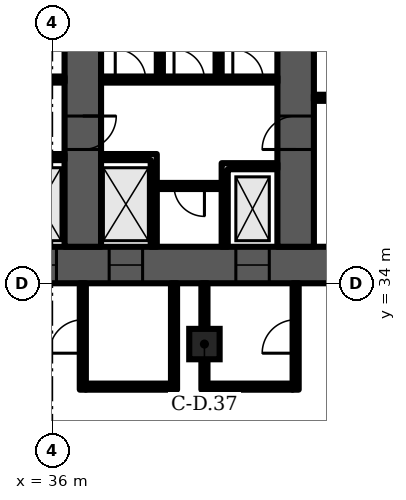
"""IFC4 building model, lengths in metres.
Left out: names, types, materials, properties, quantities, classifications, styles, units other than length and angle.
Written with IfcOpenShell. Run it as: python <this file> out.ifc"""

import sys

from ifc_helpers import new_model, si_unit, direction, frame, frame_2d, origin, origin_2d, place, context, subcontext, project, spatial, polyline, rectangle, outline, extrude, element, fill, save


model = new_model("IFC4")
c1 = context("Model", 3, precision=1e-05, world=origin(), true_north=direction((0.0, 1.0)))
c2 = subcontext(c1, "Body", "Model", "MODEL_VIEW")
j1 = project(units=[si_unit("LENGTHUNIT", "METRE"), si_unit("PLANEANGLEUNIT", "RADIAN")], contexts=[c1])
p1 = place(None, origin())
s1 = spatial("IfcSite", under=j1, at=p1, CompositionType="ELEMENT")
p2 = place(p1, origin())
s2 = spatial("IfcBuilding", under=s1, at=p2, CompositionType="ELEMENT")
p3 = place(p2, origin())
s3 = spatial("IfcBuildingStorey", under=s2, at=p3, CompositionType="ELEMENT", Elevation=0.0)
p4 = place(p3, frame((41.0, 32.0, 0.0), z_axis=(0.0, 0.0, 1.0), x_axis=(1.0, 0.0, 0.0)))
e1 = element("IfcColumn", 1, at=p4, inside=s3, PredefinedType="COLUMN", context=c2, shape_type="SweptSolid", body=[
    extrude(rectangle(XDim=1.0, YDim=1.0, at=origin_2d()), origin(), (0.0, 0.0, 1.0), 8.0),
])
p5 = place(p3, frame((9.0, 34.6, 0.0), z_axis=(0.0, 0.0, 1.0), x_axis=(1.0, 0.0, 0.0)))
e2 = element("IfcWall", 2, at=p5, inside=s3, PredefinedType="SHEAR", context=c2, shape_type="SweptSolid", body=[
    extrude(rectangle(XDim=56.0, YDim=1.2, at=frame_2d((28.0, 0.0))), origin(), (0.0, 0.0, 1.0), 7.7),
])
p6 = place(p5, frame((3.3, 0.0, 0.0)))
e3 = element("IfcOpeningElement", 3, at=p6, cuts=e2, PredefinedType="OPENING", context=c2, shape_type="SweptSolid", body=[
    extrude(rectangle(XDim=1.0, YDim=2.1, at=frame_2d((0.5, 1.05))), frame((0.0, 0.61, 0.0), z_axis=(0.0, -1.0, 0.0), x_axis=(1.0, 0.0, 0.0)), (0.0, 0.0, 1.0), 1.22),
])
p7 = place(p5, frame((7.867, 0.0, 0.0)))
e4 = element("IfcOpeningElement", 4, at=p7, cuts=e2, PredefinedType="OPENING", context=c2, shape_type="SweptSolid", body=[
    extrude(rectangle(XDim=1.1, YDim=2.1, at=frame_2d((0.55, 1.05))), frame((0.0, 0.61, 0.0), z_axis=(0.0, -1.0, 0.0), x_axis=(1.0, 0.0, 0.0)), (0.0, 0.0, 1.0), 1.22),
])
p8 = place(p5, frame((12.033, 0.0, 0.0)))
e5 = element("IfcOpeningElement", 5, at=p8, cuts=e2, PredefinedType="OPENING", context=c2, shape_type="SweptSolid", body=[
    extrude(rectangle(XDim=1.1, YDim=2.1, at=frame_2d((0.55, 1.05))), frame((0.0, 0.61, 0.0), z_axis=(0.0, -1.0, 0.0), x_axis=(1.0, 0.0, 0.0)), (0.0, 0.0, 1.0), 1.22),
])
p9 = place(p5, frame((9.8, 0.0, 0.0)))
e6 = element("IfcOpeningElement", 6, at=p9, cuts=e2, PredefinedType="OPENING", context=c2, shape_type="SweptSolid", body=[
    extrude(rectangle(XDim=1.4, YDim=2.1, at=frame_2d((0.7, 1.05))), frame((0.0, 0.61, 0.0), z_axis=(0.0, -1.0, 0.0), x_axis=(1.0, 0.0, 0.0)), (0.0, 0.0, 1.0), 1.22),
])
p10 = place(p5, frame((14.65, 0.0, 0.0)))
e7 = element("IfcOpeningElement", 7, at=p10, cuts=e2, PredefinedType="OPENING", context=c2, shape_type="SweptSolid", body=[
    extrude(rectangle(XDim=1.2, YDim=2.1, at=frame_2d((0.6, 1.05))), frame((0.0, 0.61, 0.0), z_axis=(0.0, -1.0, 0.0), x_axis=(1.0, 0.0, 0.0)), (0.0, 0.0, 1.0), 1.22),
])
p11 = place(p5, frame((21.867, 0.0, 0.0)))
e8 = element("IfcOpeningElement", 8, at=p11, cuts=e2, PredefinedType="OPENING", context=c2, shape_type="SweptSolid", body=[
    extrude(rectangle(XDim=1.1, YDim=2.1, at=frame_2d((0.55, 1.05))), frame((0.0, 0.61, 0.0), z_axis=(0.0, -1.0, 0.0), x_axis=(1.0, 0.0, 0.0)), (0.0, 0.0, 1.0), 1.22),
])
p12 = place(p5, frame((26.033, 0.0, 0.0)))
e9 = element("IfcOpeningElement", 9, at=p12, cuts=e2, PredefinedType="OPENING", context=c2, shape_type="SweptSolid", body=[
    extrude(rectangle(XDim=1.1, YDim=2.1, at=frame_2d((0.55, 1.05))), frame((0.0, 0.61, 0.0), z_axis=(0.0, -1.0, 0.0), x_axis=(1.0, 0.0, 0.0)), (0.0, 0.0, 1.0), 1.22),
])
p13 = place(p5, frame((23.8, 0.0, 0.0)))
e10 = element("IfcOpeningElement", 10, at=p13, cuts=e2, PredefinedType="OPENING", context=c2, shape_type="SweptSolid", body=[
    extrude(rectangle(XDim=1.4, YDim=2.1, at=frame_2d((0.7, 1.05))), frame((0.0, 0.61, 0.0), z_axis=(0.0, -1.0, 0.0), x_axis=(1.0, 0.0, 0.0)), (0.0, 0.0, 1.0), 1.22),
])
p14 = place(p5, frame((28.867, 0.0, 0.0)))
e11 = element("IfcOpeningElement", 11, at=p14, cuts=e2, PredefinedType="OPENING", context=c2, shape_type="SweptSolid", body=[
    extrude(rectangle(XDim=1.1, YDim=2.1, at=frame_2d((0.55, 1.05))), frame((0.0, 0.61, 0.0), z_axis=(0.0, -1.0, 0.0), x_axis=(1.0, 0.0, 0.0)), (0.0, 0.0, 1.0), 1.22),
])
p15 = place(p5, frame((33.033, 0.0, 0.0)))
e12 = element("IfcOpeningElement", 12, at=p15, cuts=e2, PredefinedType="OPENING", context=c2, shape_type="SweptSolid", body=[
    extrude(rectangle(XDim=1.1, YDim=2.1, at=frame_2d((0.55, 1.05))), frame((0.0, 0.61, 0.0), z_axis=(0.0, -1.0, 0.0), x_axis=(1.0, 0.0, 0.0)), (0.0, 0.0, 1.0), 1.22),
])
p16 = place(p5, frame((40.15, 0.0, 0.0)))
e13 = element("IfcOpeningElement", 13, at=p16, cuts=e2, PredefinedType="OPENING", context=c2, shape_type="SweptSolid", body=[
    extrude(rectangle(XDim=1.2, YDim=2.1, at=frame_2d((0.6, 1.05))), frame((0.0, 0.61, 0.0), z_axis=(0.0, -1.0, 0.0), x_axis=(1.0, 0.0, 0.0)), (0.0, 0.0, 1.0), 1.22),
])
p17 = place(p5, frame((42.867, 0.0, 0.0)))
e14 = element("IfcOpeningElement", 14, at=p17, cuts=e2, PredefinedType="OPENING", context=c2, shape_type="SweptSolid", body=[
    extrude(rectangle(XDim=1.1, YDim=2.1, at=frame_2d((0.55, 1.05))), frame((0.0, 0.61, 0.0), z_axis=(0.0, -1.0, 0.0), x_axis=(1.0, 0.0, 0.0)), (0.0, 0.0, 1.0), 1.22),
])
p18 = place(p5, frame((47.033, 0.0, 0.0)))
e15 = element("IfcOpeningElement", 15, at=p18, cuts=e2, PredefinedType="OPENING", context=c2, shape_type="SweptSolid", body=[
    extrude(rectangle(XDim=1.1, YDim=2.1, at=frame_2d((0.55, 1.05))), frame((0.0, 0.61, 0.0), z_axis=(0.0, -1.0, 0.0), x_axis=(1.0, 0.0, 0.0)), (0.0, 0.0, 1.0), 1.22),
])
p19 = place(p5, frame((44.8, 0.0, 0.0)))
e16 = element("IfcOpeningElement", 16, at=p19, cuts=e2, PredefinedType="OPENING", context=c2, shape_type="SweptSolid", body=[
    extrude(rectangle(XDim=1.4, YDim=2.1, at=frame_2d((0.7, 1.05))), frame((0.0, 0.61, 0.0), z_axis=(0.0, -1.0, 0.0), x_axis=(1.0, 0.0, 0.0)), (0.0, 0.0, 1.0), 1.22),
])
p20 = place(p5, frame((49.867, 0.0, 0.0)))
e17 = element("IfcOpeningElement", 17, at=p20, cuts=e2, PredefinedType="OPENING", context=c2, shape_type="SweptSolid", body=[
    extrude(rectangle(XDim=1.1, YDim=2.1, at=frame_2d((0.55, 1.05))), frame((0.0, 0.61, 0.0), z_axis=(0.0, -1.0, 0.0), x_axis=(1.0, 0.0, 0.0)), (0.0, 0.0, 1.0), 1.22),
])
p21 = place(p5, frame((53.5, 0.0, 0.0)))
e18 = element("IfcOpeningElement", 18, at=p21, cuts=e2, PredefinedType="OPENING", context=c2, shape_type="SweptSolid", body=[
    extrude(rectangle(XDim=1.1, YDim=2.1, at=frame_2d((0.55, 1.05))), frame((0.0, 0.61, 0.0), z_axis=(0.0, -1.0, 0.0), x_axis=(1.0, 0.0, 0.0)), (0.0, 0.0, 1.0), 1.22),
])
p22 = place(p5, frame((51.567, 0.0, 0.0)))
e19 = element("IfcOpeningElement", 19, at=p22, cuts=e2, PredefinedType="OPENING", context=c2, shape_type="SweptSolid", body=[
    extrude(rectangle(XDim=1.4, YDim=2.1, at=frame_2d((0.7, 1.05))), frame((0.0, 0.61, 0.0), z_axis=(0.0, -1.0, 0.0), x_axis=(1.0, 0.0, 0.0)), (0.0, 0.0, 1.0), 1.22),
])
p23 = place(p3, frame((37.0, 35.2, 0.0), z_axis=(0.0, 0.0, 1.0), x_axis=(0.0, 1.0, 0.0)))
e20 = element("IfcWall", 20, at=p23, inside=s3, PredefinedType="SHEAR", context=c2, shape_type="SweptSolid", body=[
    extrude(rectangle(XDim=12.8, YDim=1.2, at=frame_2d((6.4, 0.0))), origin(), (0.0, 0.0, 1.0), 7.7),
])
p24 = place(p23, frame((3.2, 0.0, 0.0)))
e21 = element("IfcOpeningElement", 21, at=p24, cuts=e20, PredefinedType="OPENING", context=c2, shape_type="SweptSolid", body=[
    extrude(rectangle(XDim=1.1, YDim=2.1, at=frame_2d((0.55, 1.05))), frame((0.0, 0.61, 0.0), z_axis=(0.0, -1.0, 0.0), x_axis=(1.0, 0.0, 0.0)), (0.0, 0.0, 1.0), 1.22),
])
p25 = place(p23, frame((9.6, 0.0, 0.0)))
e22 = element("IfcOpeningElement", 22, at=p25, cuts=e20, PredefinedType="OPENING", context=c2, shape_type="SweptSolid", body=[
    extrude(rectangle(XDim=1.0, YDim=2.1, at=frame_2d((0.5, 1.05))), frame((0.0, 0.61, 0.0), z_axis=(0.0, -1.0, 0.0), x_axis=(1.0, 0.0, 0.0)), (0.0, 0.0, 1.0), 1.22),
])
p26 = place(p3, frame((44.0, 35.2, 0.0), z_axis=(0.0, 0.0, 1.0), x_axis=(0.0, 1.0, 0.0)))
e23 = element("IfcWall", 23, at=p26, inside=s3, PredefinedType="SHEAR", context=c2, shape_type="SweptSolid", body=[
    extrude(rectangle(XDim=12.8, YDim=1.2, at=frame_2d((6.4, 0.0))), origin(), (0.0, 0.0, 1.0), 7.7),
])
p27 = place(p26, frame((3.2, 0.0, 0.0)))
e24 = element("IfcOpeningElement", 24, at=p27, cuts=e23, PredefinedType="OPENING", context=c2, shape_type="SweptSolid", body=[
    extrude(rectangle(XDim=1.1, YDim=2.1, at=frame_2d((0.55, 1.05))), frame((0.0, 0.61, 0.0), z_axis=(0.0, -1.0, 0.0), x_axis=(1.0, 0.0, 0.0)), (0.0, 0.0, 1.0), 1.22),
])
p28 = place(p26, frame((9.6, 0.0, 0.0)))
e25 = element("IfcOpeningElement", 25, at=p28, cuts=e23, PredefinedType="OPENING", context=c2, shape_type="SweptSolid", body=[
    extrude(rectangle(XDim=1.0, YDim=2.1, at=frame_2d((0.5, 1.05))), frame((0.0, 0.61, 0.0), z_axis=(0.0, -1.0, 0.0), x_axis=(1.0, 0.0, 0.0)), (0.0, 0.0, 1.0), 1.22),
])
p29 = place(p3, frame((30.6, 40.7, 0.0), z_axis=(0.0, 0.0, 1.0), x_axis=(1.0, 0.0, 0.0)))
e26 = element("IfcWall", 26, at=p29, inside=s3, PredefinedType="PARTITIONING", context=c2, shape_type="SweptSolid", body=[
    extrude(rectangle(XDim=5.8, YDim=0.2, at=frame_2d((2.9, 0.0))), origin(), (0.0, 0.0, 1.0), 7.7),
])
p30 = place(p29, frame((0.467, 0.0, 0.0)))
e27 = element("IfcOpeningElement", 27, at=p30, cuts=e26, PredefinedType="OPENING", context=c2, shape_type="SweptSolid", body=[
    extrude(rectangle(XDim=1.0, YDim=2.1, at=frame_2d((0.5, 1.05))), frame((0.0, 0.11, 0.0), z_axis=(0.0, -1.0, 0.0), x_axis=(1.0, 0.0, 0.0)), (0.0, 0.0, 1.0), 0.22),
])
p31 = place(p29, frame((2.4, 0.0, 0.0)))
e28 = element("IfcOpeningElement", 28, at=p31, cuts=e26, PredefinedType="OPENING", context=c2, shape_type="SweptSolid", body=[
    extrude(rectangle(XDim=1.0, YDim=2.1, at=frame_2d((0.5, 1.05))), frame((0.0, 0.11, 0.0), z_axis=(0.0, -1.0, 0.0), x_axis=(1.0, 0.0, 0.0)), (0.0, 0.0, 1.0), 0.22),
])
p32 = place(p29, frame((4.333, 0.0, 0.0)))
e29 = element("IfcOpeningElement", 29, at=p32, cuts=e26, PredefinedType="OPENING", context=c2, shape_type="SweptSolid", body=[
    extrude(rectangle(XDim=1.0, YDim=2.1, at=frame_2d((0.5, 1.05))), frame((0.0, 0.11, 0.0), z_axis=(0.0, -1.0, 0.0), x_axis=(1.0, 0.0, 0.0)), (0.0, 0.0, 1.0), 0.22),
])
p33 = place(p3, frame((0.0, 0.0, -0.0)))
e30 = element("IfcWall", 30, at=p33, inside=s3, PredefinedType="PARTITIONING", context=c2, shape_type="SweptSolid", body=[
    extrude(outline(polyline([(34.567, 38.25), (34.767, 38.25), (36.4, 38.25), (36.4, 38.05), (34.767, 38.05), (34.767, 35.2), (34.567, 35.2), (34.567, 38.25)])), origin(), (0.0, 0.0, 1.0), 7.7),
])
p34 = place(p3, frame((39.433, 37.2, 0.0), z_axis=(0.0, 0.0, 1.0), x_axis=(1.0, 0.0, 0.0)))
e31 = element("IfcWall", 31, at=p34, inside=s3, PredefinedType="PARTITIONING", context=c2, shape_type="SweptSolid", body=[
    extrude(rectangle(XDim=2.133, YDim=0.2, at=frame_2d((1.067, 0.0))), origin(), (0.0, 0.0, 1.0), 7.7),
])
p35 = place(p34, frame((0.567, 0.0, 0.0)))
e32 = element("IfcOpeningElement", 32, at=p35, cuts=e31, PredefinedType="OPENING", context=c2, shape_type="SweptSolid", body=[
    extrude(rectangle(XDim=1.0, YDim=2.1, at=frame_2d((0.5, 1.05))), frame((0.0, 0.11, 0.0), z_axis=(0.0, -1.0, 0.0), x_axis=(1.0, 0.0, 0.0)), (0.0, 0.0, 1.0), 0.22),
])
p36 = place(p3, frame((37.6, 40.7, 0.0), z_axis=(0.0, 0.0, 1.0), x_axis=(1.0, 0.0, 0.0)))
e33 = element("IfcWall", 33, at=p36, inside=s3, PredefinedType="PARTITIONING", context=c2, shape_type="SweptSolid", body=[
    extrude(rectangle(XDim=5.8, YDim=0.2, at=frame_2d((2.9, 0.0))), origin(), (0.0, 0.0, 1.0), 7.7),
])
p37 = place(p36, frame((0.467, 0.0, 0.0)))
e34 = element("IfcOpeningElement", 34, at=p37, cuts=e33, PredefinedType="OPENING", context=c2, shape_type="SweptSolid", body=[
    extrude(rectangle(XDim=1.0, YDim=2.1, at=frame_2d((0.5, 1.05))), frame((0.0, 0.11, 0.0), z_axis=(0.0, -1.0, 0.0), x_axis=(1.0, 0.0, 0.0)), (0.0, 0.0, 1.0), 0.22),
])
p38 = place(p36, frame((2.4, 0.0, 0.0)))
e35 = element("IfcOpeningElement", 35, at=p38, cuts=e33, PredefinedType="OPENING", context=c2, shape_type="SweptSolid", body=[
    extrude(rectangle(XDim=1.0, YDim=2.1, at=frame_2d((0.5, 1.05))), frame((0.0, 0.11, 0.0), z_axis=(0.0, -1.0, 0.0), x_axis=(1.0, 0.0, 0.0)), (0.0, 0.0, 1.0), 0.22),
])
p39 = place(p36, frame((4.333, 0.0, 0.0)))
e36 = element("IfcOpeningElement", 36, at=p39, cuts=e33, PredefinedType="OPENING", context=c2, shape_type="SweptSolid", body=[
    extrude(rectangle(XDim=1.0, YDim=2.1, at=frame_2d((0.5, 1.05))), frame((0.0, 0.11, 0.0), z_axis=(0.0, -1.0, 0.0), x_axis=(1.0, 0.0, 0.0)), (0.0, 0.0, 1.0), 0.22),
])
p40 = place(p3, frame((0.0, 0.0, -0.0)))
e37 = element("IfcWall", 37, at=p40, inside=s3, PredefinedType="PARTITIONING", context=c2, shape_type="SweptSolid", body=[
    extrude(outline(polyline([(41.567, 37.95), (41.767, 37.95), (43.4, 37.95), (43.4, 37.75), (41.767, 37.75), (41.767, 35.2), (41.567, 35.2), (41.567, 37.95)])), origin(), (0.0, 0.0, 1.0), 7.7),
])
p41 = place(p3, frame((0.0, 0.0, -0.0)))
e38 = element("IfcWall", 38, at=p41, inside=s3, PredefinedType="PARTITIONING", context=c2, shape_type="SweptSolid", body=[
    extrude(outline(polyline([(39.233, 38.05), (37.6, 38.05), (37.6, 38.25), (39.233, 38.25), (39.433, 38.25), (39.433, 35.2), (39.233, 35.2), (39.233, 38.05)])), origin(), (0.0, 0.0, 1.0), 7.7),
])
for number, where, z_axis, x_axis in (
    (39, (39.533, 40.8, 0.0), (0.0, 0.0, 1.0), (0.0, 1.0, 0.0)),
    (40, (41.467, 40.8, 0.0), (0.0, 0.0, 1.0), (0.0, 1.0, 0.0)),
):
    element("IfcWall", number, at=place(p3, frame(where, z_axis=z_axis, x_axis=x_axis)), inside=s3, PredefinedType="PARTITIONING", context=c2, shape_type="SweptSolid", body=[
        extrude(rectangle(XDim=8.653, YDim=0.2, at=frame_2d((4.326, 0.0))), origin(), (0.0, 0.0, 1.0), 7.7),
    ])
p42 = place(p3, frame((44.6, 40.1, 0.0), z_axis=(0.0, 0.0, 1.0), x_axis=(1.0, 0.0, 0.0)))
e41 = element("IfcWall", 41, at=p42, inside=s3, PredefinedType="SHEAR", context=c2, shape_type="SweptSolid", body=[
    extrude(rectangle(XDim=5.8, YDim=0.2, at=frame_2d((2.9, 0.0))), origin(), (0.0, 0.0, 1.0), 7.7),
])
p43 = place(p42, frame((3.325, 0.0, 0.0)))
e42 = element("IfcOpeningElement", 42, at=p43, cuts=e41, PredefinedType="OPENING", context=c2, shape_type="SweptSolid", body=[
    extrude(rectangle(XDim=1.2, YDim=2.1, at=frame_2d((0.6, 1.05))), frame((0.0, 0.11, 0.0), z_axis=(0.0, -1.0, 0.0), x_axis=(1.0, 0.0, 0.0)), (0.0, 0.0, 1.0), 0.22),
])
p44 = place(p42, frame((0.475, 0.0, 0.0)))
e43 = element("IfcOpeningElement", 43, at=p44, cuts=e41, PredefinedType="OPENING", context=c2, shape_type="SweptSolid", body=[
    extrude(rectangle(XDim=0.9, YDim=2.1, at=frame_2d((0.45, 1.05))), frame((0.0, 0.11, 0.0), z_axis=(0.0, -1.0, 0.0), x_axis=(1.0, 0.0, 0.0)), (0.0, 0.0, 1.0), 0.22),
])
p45 = place(p3, frame((37.0, 30.5, 0.0), z_axis=(0.0, 0.0, 1.0), x_axis=(0.0, 1.0, 0.0)))
e44 = element("IfcWall", 44, at=p45, inside=s3, PredefinedType="PARTITIONING", context=c2, shape_type="SweptSolid", body=[
    extrude(rectangle(XDim=3.5, YDim=0.2, at=frame_2d((1.75, 0.0))), origin(), (0.0, 0.0, 1.0), 7.7),
])
p46 = place(p45, frame((1.2, 0.0, 0.0)))
e45 = element("IfcOpeningElement", 45, at=p46, cuts=e44, PredefinedType="OPENING", context=c2, shape_type="SweptSolid", body=[
    extrude(rectangle(XDim=1.1, YDim=2.1, at=frame_2d((0.55, 1.05))), frame((0.0, 0.11, 0.0), z_axis=(0.0, -1.0, 0.0), x_axis=(1.0, 0.0, 0.0)), (0.0, 0.0, 1.0), 0.22),
])
p47 = place(p3, frame((40.0, 30.5, 0.0), z_axis=(0.0, 0.0, 1.0), x_axis=(0.0, 1.0, 0.0)))
e46 = element("IfcWall", 46, at=p47, inside=s3, PredefinedType="PARTITIONING", context=c2, shape_type="SweptSolid", body=[
    extrude(rectangle(XDim=3.5, YDim=0.2, at=frame_2d((1.75, 0.0))), origin(), (0.0, 0.0, 1.0), 7.7),
])
p48 = place(p3, frame((37.1, 30.6, 0.0), z_axis=(0.0, 0.0, 1.0), x_axis=(1.0, 0.0, 0.0)))
e47 = element("IfcWall", 47, at=p48, inside=s3, PredefinedType="PARTITIONING", context=c2, shape_type="SweptSolid", body=[
    extrude(rectangle(XDim=2.8, YDim=0.2, at=frame_2d((1.4, 0.0))), origin(), (0.0, 0.0, 1.0), 7.7),
])
p49 = place(p3, frame((41.0, 30.5, 0.0), z_axis=(0.0, 0.0, 1.0), x_axis=(0.0, 1.0, 0.0)))
e48 = element("IfcWall", 48, at=p49, inside=s3, PredefinedType="PARTITIONING", context=c2, shape_type="SweptSolid", body=[
    extrude(rectangle(XDim=3.5, YDim=0.2, at=frame_2d((1.75, 0.0))), origin(), (0.0, 0.0, 1.0), 7.7),
])
p50 = place(p3, frame((44.0, 30.5, 0.0), z_axis=(0.0, 0.0, 1.0), x_axis=(0.0, 1.0, 0.0)))
e49 = element("IfcWall", 49, at=p50, inside=s3, PredefinedType="PARTITIONING", context=c2, shape_type="SweptSolid", body=[
    extrude(rectangle(XDim=3.5, YDim=0.2, at=frame_2d((1.75, 0.0))), origin(), (0.0, 0.0, 1.0), 7.7),
])
p51 = place(p50, frame((1.2, 0.0, 0.0)))
e50 = element("IfcOpeningElement", 50, at=p51, cuts=e49, PredefinedType="OPENING", context=c2, shape_type="SweptSolid", body=[
    extrude(rectangle(XDim=1.1, YDim=2.1, at=frame_2d((0.55, 1.05))), frame((0.0, 0.11, 0.0), z_axis=(0.0, -1.0, 0.0), x_axis=(1.0, 0.0, 0.0)), (0.0, 0.0, 1.0), 0.22),
])
p52 = place(p3, frame((41.1, 30.6, 0.0), z_axis=(0.0, 0.0, 1.0), x_axis=(1.0, 0.0, 0.0)))
e51 = element("IfcWall", 51, at=p52, inside=s3, PredefinedType="PARTITIONING", context=c2, shape_type="SweptSolid", body=[
    extrude(rectangle(XDim=2.8, YDim=0.2, at=frame_2d((1.4, 0.0))), origin(), (0.0, 0.0, 1.0), 7.7),
])
p53 = place(p12, origin())
e52 = element("IfcDoor", 52, at=p53, inside=s3, OperationType="DOUBLE_DOOR_SLIDING", PredefinedType="DOOR", context=c2, shape_type="SweptSolid", body=[
    extrude(rectangle(XDim=1.1, YDim=2.1, at=frame_2d((0.55, 1.05))), frame((0.0, 0.025, 0.0), z_axis=(0.0, -1.0, 0.0), x_axis=(1.0, 0.0, 0.0)), (0.0, 0.0, 1.0), 0.05),
])
fill(e9, e52)
p54 = place(p35, origin())
e53 = element("IfcDoor", 53, at=p54, inside=s3, OperationType="SINGLE_SWING_RIGHT", PredefinedType="DOOR", context=c2, shape_type="SweptSolid", body=[
    extrude(rectangle(XDim=1.0, YDim=2.1, at=frame_2d((0.5, 1.05))), frame((0.0, 0.025, 0.0), z_axis=(0.0, -1.0, 0.0), x_axis=(1.0, 0.0, 0.0)), (0.0, 0.0, 1.0), 0.05),
])
fill(e32, e53)
p55 = place(p14, origin())
e54 = element("IfcDoor", 54, at=p55, inside=s3, OperationType="DOUBLE_DOOR_SLIDING", PredefinedType="DOOR", context=c2, shape_type="SweptSolid", body=[
    extrude(rectangle(XDim=1.1, YDim=2.1, at=frame_2d((0.55, 1.05))), frame((0.0, 0.025, 0.0), z_axis=(0.0, -1.0, 0.0), x_axis=(1.0, 0.0, 0.0)), (0.0, 0.0, 1.0), 0.05),
])
fill(e11, e54)
p56 = place(p15, origin())
e55 = element("IfcDoor", 55, at=p56, inside=s3, OperationType="DOUBLE_DOOR_SLIDING", PredefinedType="DOOR", context=c2, shape_type="SweptSolid", body=[
    extrude(rectangle(XDim=1.1, YDim=2.1, at=frame_2d((0.55, 1.05))), frame((0.0, 0.025, 0.0), z_axis=(0.0, -1.0, 0.0), x_axis=(1.0, 0.0, 0.0)), (0.0, 0.0, 1.0), 0.05),
])
fill(e12, e55)
p57 = place(p37, origin())
e56 = element("IfcDoor", 56, at=p57, inside=s3, OperationType="SINGLE_SWING_LEFT", PredefinedType="DOOR", context=c2, shape_type="SweptSolid", body=[
    extrude(rectangle(XDim=1.0, YDim=2.1, at=frame_2d((0.5, 1.05))), frame((0.0, 0.025, 0.0), z_axis=(0.0, -1.0, 0.0), x_axis=(1.0, 0.0, 0.0)), (0.0, 0.0, 1.0), 0.05),
])
fill(e34, e56)
p58 = place(p38, origin())
e57 = element("IfcDoor", 57, at=p58, inside=s3, OperationType="SINGLE_SWING_LEFT", PredefinedType="DOOR", context=c2, shape_type="SweptSolid", body=[
    extrude(rectangle(XDim=1.0, YDim=2.1, at=frame_2d((0.5, 1.05))), frame((0.0, 0.025, 0.0), z_axis=(0.0, -1.0, 0.0), x_axis=(1.0, 0.0, 0.0)), (0.0, 0.0, 1.0), 0.05),
])
fill(e35, e57)
p59 = place(p39, origin())
e58 = element("IfcDoor", 58, at=p59, inside=s3, OperationType="SINGLE_SWING_LEFT", PredefinedType="DOOR", context=c2, shape_type="SweptSolid", body=[
    extrude(rectangle(XDim=1.0, YDim=2.1, at=frame_2d((0.5, 1.05))), frame((0.0, 0.025, 0.0), z_axis=(0.0, -1.0, 0.0), x_axis=(1.0, 0.0, 0.0)), (0.0, 0.0, 1.0), 0.05),
])
fill(e36, e58)
p60 = place(p24, origin())
e59 = element("IfcDoor", 59, at=p60, inside=s3, OperationType="SINGLE_SWING_RIGHT", PredefinedType="DOOR", context=c2, shape_type="SweptSolid", body=[
    extrude(rectangle(XDim=1.1, YDim=2.1, at=frame_2d((0.55, 1.05))), frame((0.0, 0.025, 0.0), z_axis=(0.0, -1.0, 0.0), x_axis=(1.0, 0.0, 0.0)), (0.0, 0.0, 1.0), 0.05),
])
fill(e21, e59)
p61 = place(p27, origin())
e60 = element("IfcDoor", 60, at=p61, inside=s3, OperationType="SINGLE_SWING_LEFT", PredefinedType="DOOR", context=c2, shape_type="SweptSolid", body=[
    extrude(rectangle(XDim=1.1, YDim=2.1, at=frame_2d((0.55, 1.05))), frame((0.0, 0.025, 0.0), z_axis=(0.0, -1.0, 0.0), x_axis=(1.0, 0.0, 0.0)), (0.0, 0.0, 1.0), 0.05),
])
fill(e24, e60)
p62 = place(p46, origin())
e61 = element("IfcDoor", 61, at=p62, inside=s3, OperationType="SINGLE_SWING_LEFT", PredefinedType="DOOR", context=c2, shape_type="SweptSolid", body=[
    extrude(rectangle(XDim=1.1, YDim=2.1, at=frame_2d((0.55, 1.05))), frame((0.0, 0.025, 0.0), z_axis=(0.0, -1.0, 0.0), x_axis=(1.0, 0.0, 0.0)), (0.0, 0.0, 1.0), 0.05),
])
fill(e45, e61)
p63 = place(p51, origin())
e62 = element("IfcDoor", 62, at=p63, inside=s3, OperationType="SINGLE_SWING_LEFT", PredefinedType="DOOR", context=c2, shape_type="SweptSolid", body=[
    extrude(rectangle(XDim=1.1, YDim=2.1, at=frame_2d((0.55, 1.05))), frame((0.0, 0.025, 0.0), z_axis=(0.0, -1.0, 0.0), x_axis=(1.0, 0.0, 0.0)), (0.0, 0.0, 1.0), 0.05),
])
fill(e50, e62)
save(model, sys.argv[1])
